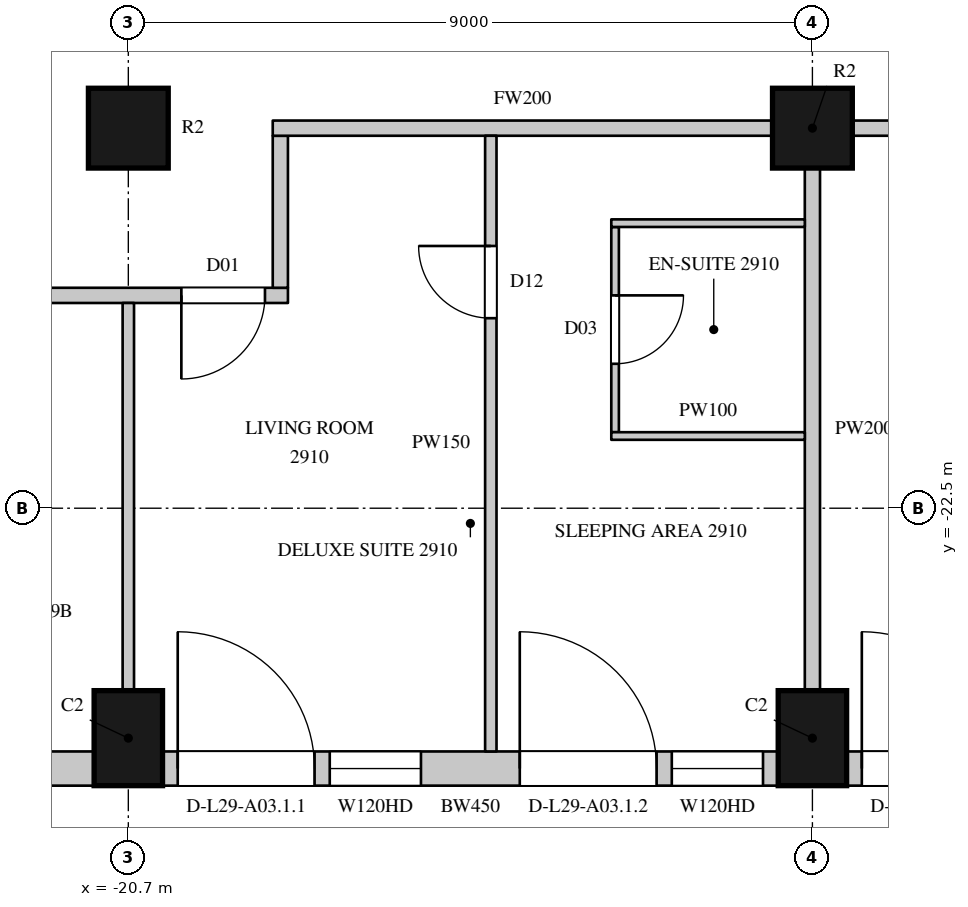
"""IFC4 building model, lengths in metres.
Left out: names, types, materials, properties, quantities, classifications, styles, units other than length and angle.
Written with IfcOpenShell. Run it as: python <this file> out.ifc"""

import sys

from ifc_helpers import new_model, si_unit, direction, frame, frame_2d, origin, origin_2d, place, context, subcontext, project, spatial, rectangle, circle, extrude, element, fill, save


model = new_model("IFC4")
c1 = context("Model", 3, precision=1e-05, world=origin(), true_north=direction((0.0, 1.0)))
c2 = subcontext(c1, "Body", "Model", "MODEL_VIEW")
j1 = project(units=[si_unit("LENGTHUNIT", "METRE"), si_unit("PLANEANGLEUNIT", "RADIAN")], contexts=[c1])
p1 = place(None, origin())
s1 = spatial("IfcSite", under=j1, at=p1, CompositionType="ELEMENT")
p2 = place(p1, origin())
s2 = spatial("IfcBuilding", under=s1, at=p2, CompositionType="ELEMENT")
p3 = place(p2, frame((0.0, 0.0, 134.7)))
s3 = spatial("IfcBuildingStorey", under=s2, at=p3, CompositionType="ELEMENT", Elevation=134.7)
for number, where, z_axis, x_axis in (
    (1, (-20.7, -25.525, 0.0), (0.0, 0.0, 1.0), (1.0, 0.0, 0.0)),
    (2, (-11.7, -25.525, 0.0), (0.0, 0.0, 1.0), (1.0, 0.0, 0.0)),
):
    element("IfcColumn", number, at=place(p3, frame(where, z_axis=z_axis, x_axis=x_axis)), inside=s3, PredefinedType="COLUMN", context=c2, shape_type="SweptSolid", body=[
        extrude(rectangle(XDim=0.9, YDim=1.25, at=origin_2d()), origin(), (0.0, 0.0, 1.0), 3.6),
    ])
for number, where, z_axis, x_axis in (
    (3, (-20.7, -17.5, 0.0), (0.0, 0.0, 1.0), (1.0, 0.0, 0.0)),
    (4, (-11.7, -17.5, 0.0), (0.0, 0.0, 1.0), (1.0, 0.0, 0.0)),
):
    element("IfcColumn", number, at=place(p3, frame(where, z_axis=z_axis, x_axis=x_axis)), inside=s3, PredefinedType="COLUMN", context=c2, shape_type="SweptSolid", body=[
        extrude(circle(Radius=0.525, at=origin_2d()), origin(), (0.0, 0.0, 1.0), 3.6),
    ])
p4 = place(p3, frame((-24.064, -25.925, 0.0), z_axis=(0.0, 0.0, 1.0), x_axis=(1.0, 0.0, 0.0)))
e5 = element("IfcWall", 5, at=p4, inside=s3, PredefinedType="SOLIDWALL", context=c2, shape_type="SweptSolid", body=[
    extrude(rectangle(XDim=2.914, YDim=0.45, at=frame_2d((1.457, 0.0))), origin(), (0.0, 0.0, 1.0), 3.3),
])
p5 = place(p3, frame((-20.25, -25.925, 0.0), z_axis=(0.0, 0.0, 1.0), x_axis=(1.0, 0.0, 0.0)))
e6 = element("IfcWall", 6, at=p5, inside=s3, PredefinedType="SOLIDWALL", context=c2, shape_type="SweptSolid", body=[
    extrude(rectangle(XDim=8.1, YDim=0.45, at=frame_2d((4.05, 0.0))), origin(), (0.0, 0.0, 1.0), 3.3),
])
p6 = place(p5, frame((0.2, 0.0, 0.0)))
e7 = element("IfcOpeningElement", 7, at=p6, cuts=e6, PredefinedType="OPENING", context=c2, shape_type="SweptSolid", body=[
    extrude(rectangle(XDim=1.8, YDim=2.4, at=frame_2d((0.9, 1.2))), frame((0.0, 0.235, 0.0), z_axis=(0.0, -1.0, 0.0), x_axis=(1.0, 0.0, 0.0)), (0.0, 0.0, 1.0), 0.47),
])
p7 = place(p5, frame((2.2, 0.0, 1.05)))
e8 = element("IfcOpeningElement", 8, at=p7, cuts=e6, PredefinedType="OPENING", context=c2, shape_type="SweptSolid", body=[
    extrude(rectangle(XDim=1.2, YDim=2.0, at=frame_2d((0.6, 1.0))), frame((0.0, 0.235, 0.0), z_axis=(0.0, -1.0, 0.0), x_axis=(1.0, 0.0, 0.0)), (0.0, 0.0, 1.0), 0.47),
])
p8 = place(p5, frame((4.7, 0.0, 0.0)))
e9 = element("IfcOpeningElement", 9, at=p8, cuts=e6, PredefinedType="OPENING", context=c2, shape_type="SweptSolid", body=[
    extrude(rectangle(XDim=1.8, YDim=2.4, at=frame_2d((0.9, 1.2))), frame((0.0, 0.235, 0.0), z_axis=(0.0, -1.0, 0.0), x_axis=(1.0, 0.0, 0.0)), (0.0, 0.0, 1.0), 0.47),
])
p9 = place(p5, frame((6.7, 0.0, 1.05)))
e10 = element("IfcOpeningElement", 10, at=p9, cuts=e6, PredefinedType="OPENING", context=c2, shape_type="SweptSolid", body=[
    extrude(rectangle(XDim=1.2, YDim=2.0, at=frame_2d((0.6, 1.0))), frame((0.0, 0.235, 0.0), z_axis=(0.0, -1.0, 0.0), x_axis=(1.0, 0.0, 0.0)), (0.0, 0.0, 1.0), 0.47),
])
p10 = place(p3, frame((-11.25, -25.925, 0.0), z_axis=(0.0, 0.0, 1.0), x_axis=(1.0, 0.0, 0.0)))
e11 = element("IfcWall", 11, at=p10, inside=s3, PredefinedType="SOLIDWALL", context=c2, shape_type="SweptSolid", body=[
    extrude(rectangle(XDim=8.1, YDim=0.45, at=frame_2d((4.05, 0.0))), origin(), (0.0, 0.0, 1.0), 3.3),
])
p11 = place(p10, frame((0.2, 0.0, 0.0)))
e12 = element("IfcOpeningElement", 12, at=p11, cuts=e11, PredefinedType="OPENING", context=c2, shape_type="SweptSolid", body=[
    extrude(rectangle(XDim=1.8, YDim=2.4, at=frame_2d((0.9, 1.2))), frame((0.0, 0.235, 0.0), z_axis=(0.0, -1.0, 0.0), x_axis=(1.0, 0.0, 0.0)), (0.0, 0.0, 1.0), 0.47),
])
p12 = place(p10, frame((2.2, 0.0, 1.05)))
e13 = element("IfcOpeningElement", 13, at=p12, cuts=e11, PredefinedType="OPENING", context=c2, shape_type="SweptSolid", body=[
    extrude(rectangle(XDim=1.2, YDim=2.0, at=frame_2d((0.6, 1.0))), frame((0.0, 0.235, 0.0), z_axis=(0.0, -1.0, 0.0), x_axis=(1.0, 0.0, 0.0)), (0.0, 0.0, 1.0), 0.47),
])
p13 = place(p10, frame((4.25, 0.0, 0.0)))
e14 = element("IfcOpeningElement", 14, at=p13, cuts=e11, PredefinedType="OPENING", context=c2, shape_type="SweptSolid", body=[
    extrude(rectangle(XDim=1.8, YDim=2.4, at=frame_2d((0.9, 1.2))), frame((0.0, 0.235, 0.0), z_axis=(0.0, -1.0, 0.0), x_axis=(1.0, 0.0, 0.0)), (0.0, 0.0, 1.0), 0.47),
])
p14 = place(p10, frame((6.7, 0.0, 1.05)))
e15 = element("IfcOpeningElement", 15, at=p14, cuts=e11, PredefinedType="OPENING", context=c2, shape_type="SweptSolid", body=[
    extrude(rectangle(XDim=1.2, YDim=2.0, at=frame_2d((0.6, 1.0))), frame((0.0, 0.235, 0.0), z_axis=(0.0, -1.0, 0.0), x_axis=(1.0, 0.0, 0.0)), (0.0, 0.0, 1.0), 0.47),
])
p15 = place(p3, frame((-23.752, -19.7, 0.0), z_axis=(0.0, 0.0, 1.0), x_axis=(1.0, 0.0, 0.0)))
e16 = element("IfcWall", 16, at=p15, inside=s3, PredefinedType="PARTITIONING", context=c2, shape_type="SweptSolid", body=[
    extrude(rectangle(XDim=5.152, YDim=0.2, at=frame_2d((2.576, 0.0))), origin(), (0.0, 0.0, 1.0), 3.3),
])
p16 = place(p15, frame((0.85, 0.0, 0.0)))
e17 = element("IfcOpeningElement", 17, at=p16, cuts=e16, PredefinedType="OPENING", context=c2, shape_type="SweptSolid", body=[
    extrude(rectangle(XDim=0.9, YDim=2.2, at=frame_2d((0.45, 1.1))), frame((0.0, 0.11, 0.0), z_axis=(0.0, -1.0, 0.0), x_axis=(1.0, 0.0, 0.0)), (0.0, 0.0, 1.0), 0.22),
])
p17 = place(p15, frame((3.75, 0.0, 0.0)))
e18 = element("IfcOpeningElement", 18, at=p17, cuts=e16, PredefinedType="OPENING", context=c2, shape_type="SweptSolid", body=[
    extrude(rectangle(XDim=1.1, YDim=2.4, at=frame_2d((0.55, 1.2))), frame((0.0, 0.11, 0.0), z_axis=(0.0, -1.0, 0.0), x_axis=(1.0, 0.0, 0.0)), (0.0, 0.0, 1.0), 0.22),
])
p18 = place(p3, frame((-18.7, -19.6, 0.0), z_axis=(0.0, 0.0, 1.0), x_axis=(0.0, 1.0, 0.0)))
e19 = element("IfcWall", 19, at=p18, inside=s3, PredefinedType="PARTITIONING", context=c2, shape_type="SweptSolid", body=[
    extrude(rectangle(XDim=2.0, YDim=0.2, at=frame_2d((1.0, 0.0))), origin(), (0.0, 0.0, 1.0), 3.3),
])
p19 = place(p3, frame((-18.8, -17.5, 0.0), z_axis=(0.0, 0.0, 1.0), x_axis=(1.0, 0.0, 0.0)))
e20 = element("IfcWall", 20, at=p19, inside=s3, PredefinedType="PARTITIONING", context=c2, shape_type="SweptSolid", body=[
    extrude(rectangle(XDim=6.575, YDim=0.2, at=frame_2d((3.288, 0.0))), origin(), (0.0, 0.0, 1.0), 2.75),
])
p20 = place(p3, frame((-11.175, -17.5, 0.0), z_axis=(0.0, 0.0, 1.0), x_axis=(1.0, 0.0, 0.0)))
e21 = element("IfcWall", 21, at=p20, inside=s3, PredefinedType="PARTITIONING", context=c2, shape_type="SweptSolid", body=[
    extrude(rectangle(XDim=7.95, YDim=0.2, at=frame_2d((3.975, 0.0))), origin(), (0.0, 0.0, 1.0), 2.75),
])
p21 = place(p20, frame((2.75, 0.0, 0.0)))
e22 = element("IfcOpeningElement", 22, at=p21, cuts=e21, PredefinedType="OPENING", context=c2, shape_type="SweptSolid", body=[
    extrude(rectangle(XDim=1.1, YDim=2.4, at=frame_2d((0.55, 1.2))), frame((0.0, 0.11, 0.0), z_axis=(0.0, -1.0, 0.0), x_axis=(1.0, 0.0, 0.0)), (0.0, 0.0, 1.0), 0.22),
])
p22 = place(p3, frame((-20.7, -24.9, 0.0), z_axis=(0.0, 0.0, 1.0), x_axis=(0.0, 1.0, 0.0)))
e23 = element("IfcWall", 23, at=p22, inside=s3, PredefinedType="PARTITIONING", context=c2, shape_type="SweptSolid", body=[
    extrude(rectangle(XDim=5.1, YDim=0.15, at=frame_2d((2.55, 0.0))), origin(), (0.0, 0.0, 1.0), 2.75),
])
p23 = place(p3, frame((-15.931, -25.7, 0.0), z_axis=(0.0, 0.0, 1.0), x_axis=(0.0, 1.0, 0.0)))
e24 = element("IfcWall", 24, at=p23, inside=s3, PredefinedType="PARTITIONING", context=c2, shape_type="SweptSolid", body=[
    extrude(rectangle(XDim=8.1, YDim=0.15, at=frame_2d((4.05, 0.0))), origin(), (0.0, 0.0, 1.0), 3.3),
])
p24 = place(p23, frame((5.7, 0.0, 0.0)))
e25 = element("IfcOpeningElement", 25, at=p24, cuts=e24, PredefinedType="OPENING", context=c2, shape_type="SweptSolid", body=[
    extrude(rectangle(XDim=0.95, YDim=2.2, at=frame_2d((0.475, 1.1))), frame((0.0, 0.085, 0.0), z_axis=(0.0, -1.0, 0.0), x_axis=(1.0, 0.0, 0.0)), (0.0, 0.0, 1.0), 0.17),
])
p25 = place(p3, frame((-11.7, -24.9, 0.0), z_axis=(0.0, 0.0, 1.0), x_axis=(0.0, 1.0, 0.0)))
e26 = element("IfcWall", 26, at=p25, inside=s3, PredefinedType="PARTITIONING", context=c2, shape_type="SweptSolid", body=[
    extrude(rectangle(XDim=6.875, YDim=0.2, at=frame_2d((3.438, 0.0))), origin(), (0.0, 0.0, 1.0), 2.75),
])
p26 = place(p3, frame((-14.296, -21.5, 0.0), z_axis=(0.0, 0.0, 1.0), x_axis=(0.0, 1.0, 0.0)))
e27 = element("IfcWall", 27, at=p26, inside=s3, PredefinedType="PARTITIONING", context=c2, shape_type="SweptSolid", body=[
    extrude(rectangle(XDim=2.7, YDim=0.1, at=frame_2d((1.35, 0.0))), origin(), (0.0, 0.0, 1.0), 3.3),
])
p27 = place(p26, frame((0.9, 0.0, 0.0)))
e28 = element("IfcOpeningElement", 28, at=p27, cuts=e27, PredefinedType="OPENING", context=c2, shape_type="SweptSolid", body=[
    extrude(rectangle(XDim=0.9, YDim=2.2, at=frame_2d((0.45, 1.1))), frame((0.0, 0.06, 0.0), z_axis=(0.0, -1.0, 0.0), x_axis=(1.0, 0.0, 0.0)), (0.0, 0.0, 1.0), 0.12),
])
for number, where, z_axis, x_axis in (
    (29, (-14.346, -21.55, 0.0), (0.0, 0.0, 1.0), (1.0, 0.0, 0.0)),
    (30, (-14.346, -18.75, 0.0), (0.0, 0.0, 1.0), (1.0, 0.0, 0.0)),
):
    element("IfcWall", number, at=place(p3, frame(where, z_axis=z_axis, x_axis=x_axis)), inside=s3, PredefinedType="PARTITIONING", context=c2, shape_type="SweptSolid", body=[
        extrude(rectangle(XDim=2.546, YDim=0.1, at=frame_2d((1.273, 0.0))), origin(), (0.0, 0.0, 1.0), 3.3),
    ])
p28 = place(p6, origin())
e31 = element("IfcDoor", 31, at=p28, inside=s3, OperationType="SLIDING_TO_LEFT", PredefinedType="DOOR", context=c2, shape_type="SweptSolid", body=[
    extrude(rectangle(XDim=1.8, YDim=2.4, at=frame_2d((0.9, 1.2))), frame((0.0, 0.13, 0.0), z_axis=(0.0, -1.0, 0.0), x_axis=(1.0, 0.0, 0.0)), (0.0, 0.0, 1.0), 0.05),
])
fill(e7, e31)
p29 = place(p7, origin())
e32 = element("IfcWindow", 32, at=p29, inside=s3, PartitioningType="SINGLE_PANEL", PredefinedType="WINDOW", context=c2, shape_type="SweptSolid", body=[
    extrude(rectangle(XDim=1.2, YDim=2.0, at=frame_2d((0.6, 1.0))), frame((0.0, 0.135, 0.0), z_axis=(0.0, -1.0, 0.0), x_axis=(1.0, 0.0, 0.0)), (0.0, 0.0, 1.0), 0.06),
])
fill(e8, e32)
p30 = place(p8, origin())
e33 = element("IfcDoor", 33, at=p30, inside=s3, OperationType="SLIDING_TO_LEFT", PredefinedType="DOOR", context=c2, shape_type="SweptSolid", body=[
    extrude(rectangle(XDim=1.8, YDim=2.4, at=frame_2d((0.9, 1.2))), frame((0.0, 0.13, 0.0), z_axis=(0.0, -1.0, 0.0), x_axis=(1.0, 0.0, 0.0)), (0.0, 0.0, 1.0), 0.05),
])
fill(e9, e33)
p31 = place(p9, origin())
e34 = element("IfcWindow", 34, at=p31, inside=s3, PartitioningType="SINGLE_PANEL", PredefinedType="WINDOW", context=c2, shape_type="SweptSolid", body=[
    extrude(rectangle(XDim=1.2, YDim=2.0, at=frame_2d((0.6, 1.0))), frame((0.0, 0.135, 0.0), z_axis=(0.0, -1.0, 0.0), x_axis=(1.0, 0.0, 0.0)), (0.0, 0.0, 1.0), 0.06),
])
fill(e10, e34)
p32 = place(p11, origin())
e35 = element("IfcDoor", 35, at=p32, inside=s3, OperationType="SLIDING_TO_LEFT", PredefinedType="DOOR", context=c2, shape_type="SweptSolid", body=[
    extrude(rectangle(XDim=1.8, YDim=2.4, at=frame_2d((0.9, 1.2))), frame((0.0, 0.13, 0.0), z_axis=(0.0, -1.0, 0.0), x_axis=(1.0, 0.0, 0.0)), (0.0, 0.0, 1.0), 0.05),
])
fill(e12, e35)
p33 = place(p17, origin())
e36 = element("IfcDoor", 36, at=p33, inside=s3, OperationType="SINGLE_SWING_RIGHT", PredefinedType="DOOR", context=c2, shape_type="SweptSolid", body=[
    extrude(rectangle(XDim=1.1, YDim=2.4, at=frame_2d((0.55, 1.2))), frame((0.0, 0.025, 0.0), z_axis=(0.0, -1.0, 0.0), x_axis=(1.0, 0.0, 0.0)), (0.0, 0.0, 1.0), 0.05),
])
fill(e18, e36)
p34 = place(p24, origin())
e37 = element("IfcDoor", 37, at=p34, inside=s3, OperationType="SINGLE_SWING_RIGHT", PredefinedType="DOOR", context=c2, shape_type="SweptSolid", body=[
    extrude(rectangle(XDim=0.95, YDim=2.2, at=frame_2d((0.475, 1.1))), frame((0.0, 0.025, 0.0), z_axis=(0.0, -1.0, 0.0), x_axis=(1.0, 0.0, 0.0)), (0.0, 0.0, 1.0), 0.05),
])
fill(e25, e37)
p35 = place(p27, origin())
e38 = element("IfcDoor", 38, at=p35, inside=s3, OperationType="SINGLE_SWING_LEFT", PredefinedType="DOOR", context=c2, shape_type="SweptSolid", body=[
    extrude(rectangle(XDim=0.9, YDim=2.2, at=frame_2d((0.45, 1.1))), frame((0.0, 0.025, 0.0), z_axis=(0.0, -1.0, 0.0), x_axis=(1.0, 0.0, 0.0)), (0.0, 0.0, 1.0), 0.05),
])
fill(e28, e38)
save(model, sys.argv[1])
